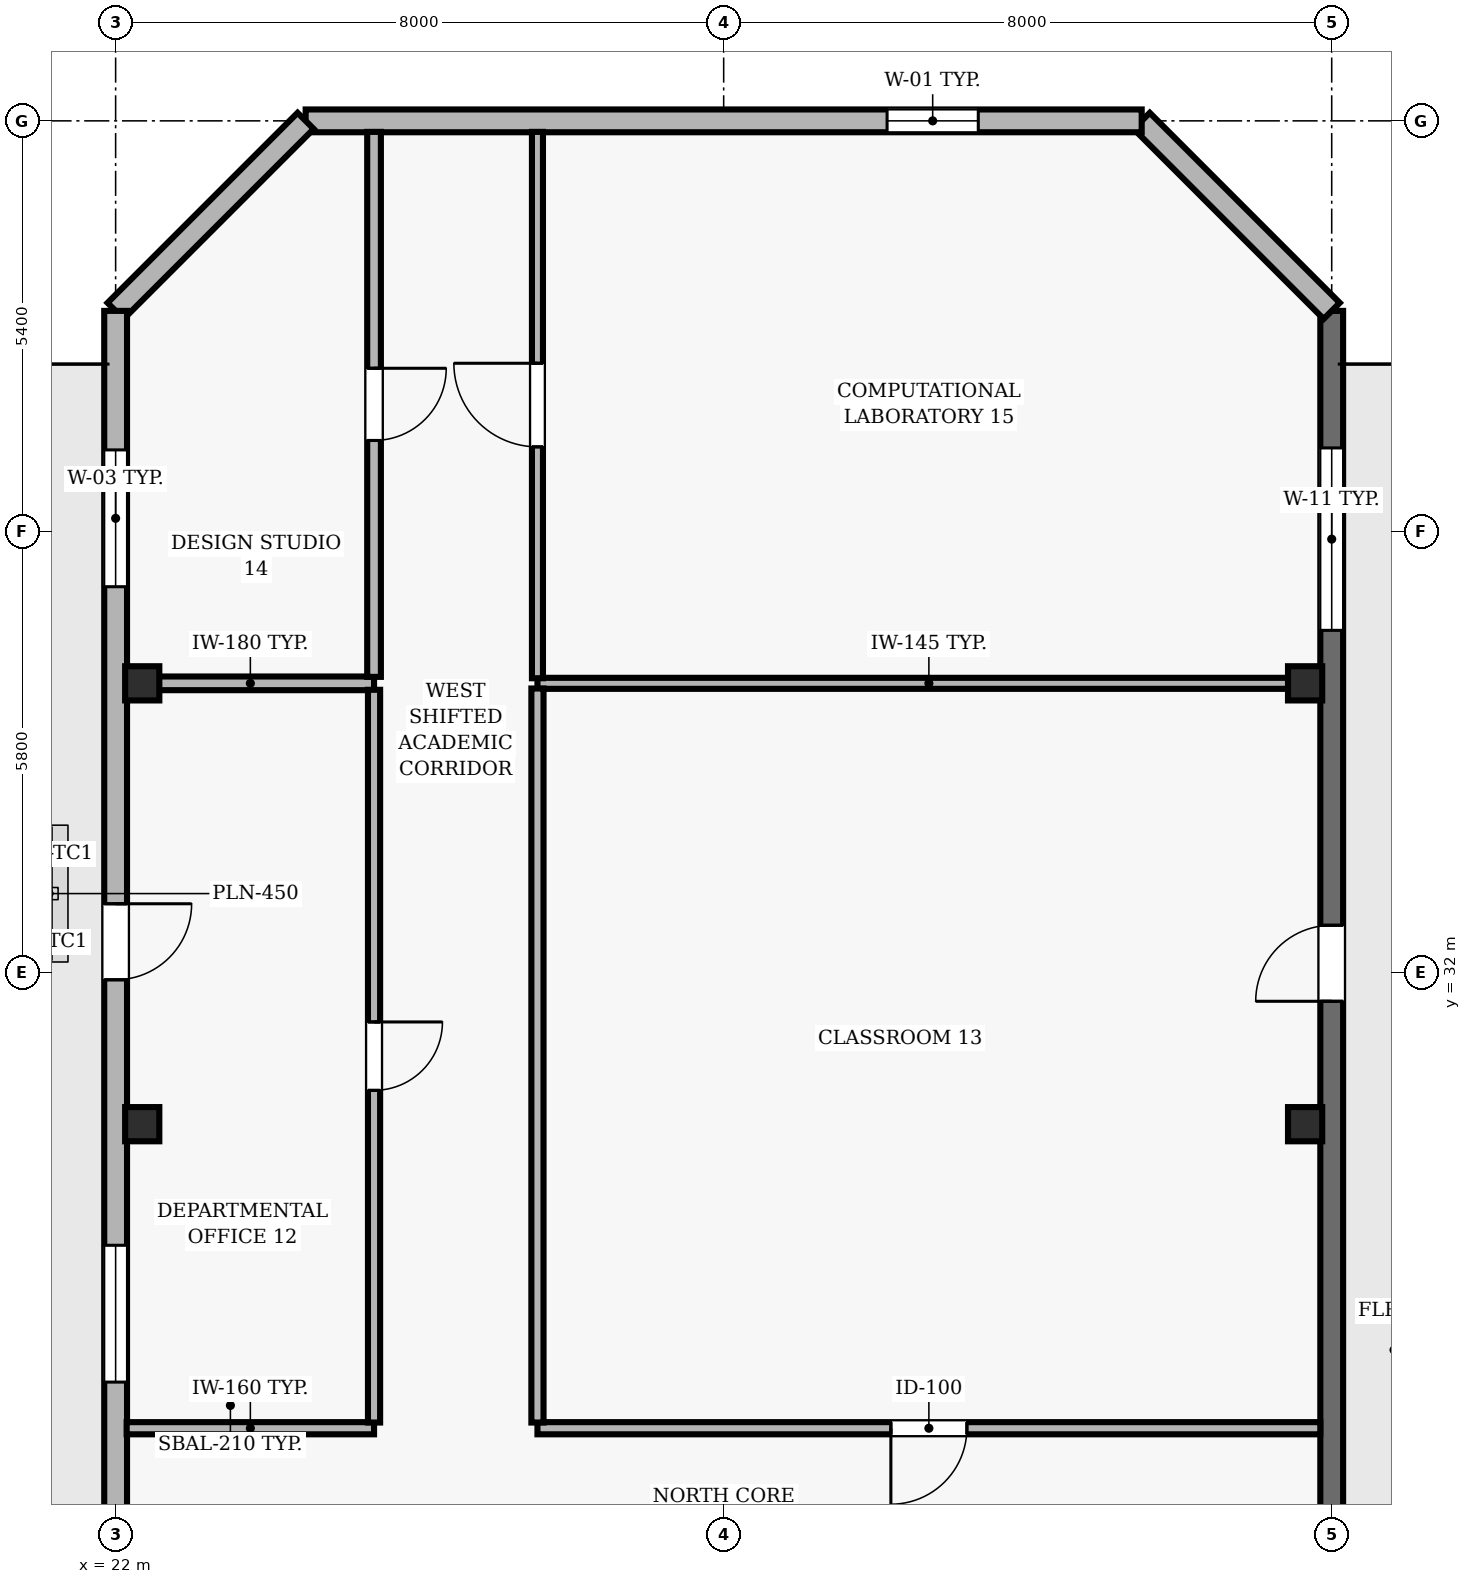
"""IFC4 building model, lengths in metres.
Left out: names, types, materials, properties, quantities, classifications, styles, units other than length and angle.
Written with IfcOpenShell. Run it as: python <this file> out.ifc"""

import sys

from ifc_helpers import new_model, si_unit, direction, frame, frame_2d, origin, origin_2d, place, context, subcontext, project, spatial, rectangle, hollow_rectangle, extrude, element, fill, save


model = new_model("IFC4")
c1 = context("Model", 3, precision=1e-05, world=origin(), true_north=direction((0.0, 1.0)))
c2 = subcontext(c1, "Body", "Model", "MODEL_VIEW")
j1 = project(units=[si_unit("LENGTHUNIT", "METRE"), si_unit("PLANEANGLEUNIT", "RADIAN")], contexts=[c1])
p1 = place(None, origin())
s1 = spatial("IfcSite", under=j1, at=p1, CompositionType="ELEMENT")
p2 = place(p1, origin())
s2 = spatial("IfcBuilding", under=s1, at=p2, CompositionType="ELEMENT")
p3 = place(p2, frame((0.0, 0.0, 207.0)))
s3 = spatial("IfcBuildingStorey", under=s2, at=p3, CompositionType="ELEMENT", Elevation=207.0)
for number, where, z_axis, x_axis in (
    (1, (22.35, 30.0, 0.0), (0.0, 0.0, 1.0), (1.0, 0.0, 0.0)),
    (2, (37.65, 30.0, 0.0), (0.0, 0.0, 1.0), (1.0, 0.0, 0.0)),
    (3, (22.35, 35.8, 0.0), (0.0, 0.0, 1.0), (1.0, 0.0, 0.0)),
    (4, (37.65, 35.8, 0.0), (0.0, 0.0, 1.0), (1.0, 0.0, 0.0)),
):
    element("IfcColumn", number, at=place(p3, frame(where, z_axis=z_axis, x_axis=x_axis)), inside=s3, PredefinedType="COLUMN", context=c2, shape_type="SweptSolid", body=[
        extrude(hollow_rectangle(XDim=0.45, YDim=0.45, WallThickness=0.02, at=origin_2d()), origin(), (0.0, 0.0, 1.0), 3.9),
    ])
p4 = place(p3, frame((38.0, 22.683, 0.0), z_axis=(0.0, 0.0, 1.0), x_axis=(0.0, 1.0, 0.0)))
e5 = element("IfcWall", 5, at=p4, inside=s3, PredefinedType="SOLIDWALL", context=c2, shape_type="SweptSolid", body=[
    extrude(rectangle(XDim=18.017, YDim=0.3, at=frame_2d((9.008, 0.0))), origin(), (0.0, 0.0, 1.0), 3.69),
])
p5 = place(p4, frame((8.934, 0.0, 0.0)))
e6 = element("IfcOpeningElement", 6, at=p5, cuts=e5, PredefinedType="OPENING", context=c2, shape_type="SweptSolid", body=[
    extrude(rectangle(XDim=1.0, YDim=2.2, at=frame_2d((0.5, 1.1))), frame((0.0, 0.16, 0.0), z_axis=(0.0, -1.0, 0.0), x_axis=(1.0, 0.0, 0.0)), (0.0, 0.0, 1.0), 0.32),
])
p6 = place(p4, frame((13.814, 0.0, 0.9)))
e7 = element("IfcOpeningElement", 7, at=p6, cuts=e5, PredefinedType="OPENING", context=c2, shape_type="SweptSolid", body=[
    extrude(rectangle(XDim=2.4, YDim=2.2, at=frame_2d((1.2, 1.1))), frame((0.0, 0.16, 0.0), z_axis=(0.0, -1.0, 0.0), x_axis=(1.0, 0.0, 0.0)), (0.0, 0.0, 1.0), 0.32),
])
p7 = place(p3, frame((38.0, 40.7, 0.0), z_axis=(0.0, 0.0, 1.0), x_axis=(-0.707106781187, 0.707106781187, 0.0)))
e8 = element("IfcWall", 8, at=p7, inside=s3, PredefinedType="SOLIDWALL", context=c2, shape_type="SweptSolid", body=[
    extrude(rectangle(XDim=3.536, YDim=0.3, at=frame_2d((1.768, 0.0))), origin(), (0.0, 0.0, 1.0), 3.69),
])
p8 = place(p3, frame((35.5, 43.2, 0.0), z_axis=(0.0, 0.0, 1.0), x_axis=(-1.0, 0.0, 0.0)))
e9 = element("IfcWall", 9, at=p8, inside=s3, PredefinedType="SOLIDWALL", context=c2, shape_type="SweptSolid", body=[
    extrude(rectangle(XDim=11.0, YDim=0.3, at=frame_2d((5.5, 0.0))), origin(), (0.0, 0.0, 1.0), 3.69),
])
p9 = place(p8, frame((2.15, 0.0, 0.9)))
e10 = element("IfcOpeningElement", 10, at=p9, cuts=e9, PredefinedType="OPENING", context=c2, shape_type="SweptSolid", body=[
    extrude(rectangle(XDim=1.2, YDim=1.6, at=frame_2d((0.6, 0.8))), frame((0.0, 0.16, 0.0), z_axis=(0.0, -1.0, 0.0), x_axis=(1.0, 0.0, 0.0)), (0.0, 0.0, 1.0), 0.32),
])
p10 = place(p3, frame((24.5, 43.2, 0.0), z_axis=(0.0, 0.0, 1.0), x_axis=(-0.707106781187, -0.707106781187, 0.0)))
e11 = element("IfcWall", 11, at=p10, inside=s3, PredefinedType="SOLIDWALL", context=c2, shape_type="SweptSolid", body=[
    extrude(rectangle(XDim=3.536, YDim=0.3, at=frame_2d((1.768, 0.0))), origin(), (0.0, 0.0, 1.0), 3.69),
])
p11 = place(p3, frame((22.0, 40.7, 0.0), z_axis=(0.0, 0.0, 1.0), x_axis=(0.0, -1.0, 0.0)))
e12 = element("IfcWall", 12, at=p11, inside=s3, PredefinedType="SOLIDWALL", context=c2, shape_type="SweptSolid", body=[
    extrude(rectangle(XDim=38.2, YDim=0.3, at=frame_2d((19.1, 0.0))), origin(), (0.0, 0.0, 1.0), 3.69),
])
p12 = place(p11, frame((7.8, 0.0, 0.0)))
e13 = element("IfcOpeningElement", 13, at=p12, cuts=e12, PredefinedType="OPENING", context=c2, shape_type="SweptSolid", body=[
    extrude(rectangle(XDim=1.0, YDim=2.2, at=frame_2d((0.5, 1.1))), frame((0.0, 0.16, 0.0), z_axis=(0.0, -1.0, 0.0), x_axis=(1.0, 0.0, 0.0)), (0.0, 0.0, 1.0), 0.32),
])
p13 = place(p11, frame((1.829, 0.0, 0.9)))
e14 = element("IfcOpeningElement", 14, at=p13, cuts=e12, PredefinedType="OPENING", context=c2, shape_type="SweptSolid", body=[
    extrude(rectangle(XDim=1.8, YDim=1.6, at=frame_2d((0.9, 0.8))), frame((0.0, 0.16, 0.0), z_axis=(0.0, -1.0, 0.0), x_axis=(1.0, 0.0, 0.0)), (0.0, 0.0, 1.0), 0.32),
])
p14 = place(p11, frame((12.293, 0.0, 0.9)))
e15 = element("IfcOpeningElement", 15, at=p14, cuts=e12, PredefinedType="OPENING", context=c2, shape_type="SweptSolid", body=[
    extrude(rectangle(XDim=1.8, YDim=1.6, at=frame_2d((0.9, 0.8))), frame((0.0, 0.16, 0.0), z_axis=(0.0, -1.0, 0.0), x_axis=(1.0, 0.0, 0.0)), (0.0, 0.0, 1.0), 0.32),
])
p15 = place(p11, frame((18.2, 0.0, 0.9)))
e16 = element("IfcOpeningElement", 16, at=p15, cuts=e12, PredefinedType="OPENING", context=c2, shape_type="SweptSolid", body=[
    extrude(rectangle(XDim=1.8, YDim=1.6, at=frame_2d((0.9, 0.8))), frame((0.0, 0.16, 0.0), z_axis=(0.0, -1.0, 0.0), x_axis=(1.0, 0.0, 0.0)), (0.0, 0.0, 1.0), 0.32),
])
p16 = place(p11, frame((23.207, 0.0, 0.9)))
e17 = element("IfcOpeningElement", 17, at=p16, cuts=e12, PredefinedType="OPENING", context=c2, shape_type="SweptSolid", body=[
    extrude(rectangle(XDim=1.8, YDim=1.6, at=frame_2d((0.9, 0.8))), frame((0.0, 0.16, 0.0), z_axis=(0.0, -1.0, 0.0), x_axis=(1.0, 0.0, 0.0)), (0.0, 0.0, 1.0), 0.32),
])
p17 = place(p11, frame((29.114, 0.0, 0.9)))
e18 = element("IfcOpeningElement", 18, at=p17, cuts=e12, PredefinedType="OPENING", context=c2, shape_type="SweptSolid", body=[
    extrude(rectangle(XDim=1.8, YDim=1.6, at=frame_2d((0.9, 0.8))), frame((0.0, 0.16, 0.0), z_axis=(0.0, -1.0, 0.0), x_axis=(1.0, 0.0, 0.0)), (0.0, 0.0, 1.0), 0.32),
])
p18 = place(p3, frame((25.4, 26.0, 0.0), z_axis=(0.0, 0.0, 1.0), x_axis=(-1.0, 0.0, 0.0)))
e19 = element("IfcWall", 19, at=p18, inside=s3, PredefinedType="PARTITIONING", context=c2, shape_type="SweptSolid", body=[
    extrude(rectangle(XDim=3.255, YDim=0.16, at=frame_2d((1.627, 0.0))), origin(), (0.0, 0.0, 1.0), 3.69),
])
p19 = place(p3, frame((25.4, 35.8, 0.0), z_axis=(0.0, 0.0, 1.0), x_axis=(-1.0, 0.0, 0.0)))
e20 = element("IfcWall", 20, at=p19, inside=s3, PredefinedType="PARTITIONING", context=c2, shape_type="SweptSolid", body=[
    extrude(rectangle(XDim=3.255, YDim=0.18, at=frame_2d((1.627, 0.0))), origin(), (0.0, 0.0, 1.0), 3.139),
])
p20 = place(p3, frame((37.85, 26.0, 0.0), z_axis=(0.0, 0.0, 1.0), x_axis=(-1.0, 0.0, 0.0)))
e21 = element("IfcWall", 21, at=p20, inside=s3, PredefinedType="PARTITIONING", context=c2, shape_type="SweptSolid", body=[
    extrude(rectangle(XDim=10.3, YDim=0.16, at=frame_2d((5.15, 0.0))), origin(), (0.0, 0.0, 1.0), 3.69),
])
p21 = place(p20, frame((4.65, 0.0, 0.0)))
e22 = element("IfcOpeningElement", 22, at=p21, cuts=e21, PredefinedType="OPENING", context=c2, shape_type="SweptSolid", body=[
    extrude(rectangle(XDim=1.0, YDim=2.1, at=frame_2d((0.5, 1.05))), frame((0.0, 0.09, 0.0), z_axis=(0.0, -1.0, 0.0), x_axis=(1.0, 0.0, 0.0)), (0.0, 0.0, 1.0), 0.18),
])
p22 = place(p3, frame((37.85, 35.8, 0.0), z_axis=(0.0, 0.0, 1.0), x_axis=(-1.0, 0.0, 0.0)))
e23 = element("IfcWall", 23, at=p22, inside=s3, PredefinedType="PARTITIONING", context=c2, shape_type="SweptSolid", body=[
    extrude(rectangle(XDim=10.3, YDim=0.145, at=frame_2d((5.15, 0.0))), origin(), (0.0, 0.0, 1.0), 3.139),
])
p23 = place(p3, frame((25.4, 35.715, 0.0), z_axis=(0.0, 0.0, 1.0), x_axis=(0.0, -1.0, 0.0)))
e24 = element("IfcWall", 24, at=p23, inside=s3, PredefinedType="PARTITIONING", context=c2, shape_type="SweptSolid", body=[
    extrude(rectangle(XDim=9.64, YDim=0.16, at=frame_2d((4.82, 0.0))), origin(), (0.0, 0.0, 1.0), 3.69),
])
p24 = place(p23, frame((4.37, 0.0, 0.0)))
e25 = element("IfcOpeningElement", 25, at=p24, cuts=e24, PredefinedType="OPENING", context=c2, shape_type="SweptSolid", body=[
    extrude(rectangle(XDim=0.9, YDim=2.1, at=frame_2d((0.45, 1.05))), frame((0.0, 0.09, 0.0), z_axis=(0.0, -1.0, 0.0), x_axis=(1.0, 0.0, 0.0)), (0.0, 0.0, 1.0), 0.18),
])
p25 = place(p3, frame((25.4, 43.055, 0.0), z_axis=(0.0, 0.0, 1.0), x_axis=(0.0, -1.0, 0.0)))
e26 = element("IfcWall", 26, at=p25, inside=s3, PredefinedType="PARTITIONING", context=c2, shape_type="SweptSolid", body=[
    extrude(rectangle(XDim=7.17, YDim=0.18, at=frame_2d((3.585, 0.0))), origin(), (0.0, 0.0, 1.0), 3.69),
])
p26 = place(p25, frame((3.11, 0.0, 0.0)))
e27 = element("IfcOpeningElement", 27, at=p26, cuts=e26, PredefinedType="OPENING", context=c2, shape_type="SweptSolid", body=[
    extrude(rectangle(XDim=0.95, YDim=2.1, at=frame_2d((0.475, 1.05))), frame((0.0, 0.1, 0.0), z_axis=(0.0, -1.0, 0.0), x_axis=(1.0, 0.0, 0.0)), (0.0, 0.0, 1.0), 0.2),
])
p27 = place(p3, frame((27.55, 26.075, 0.0), z_axis=(0.0, 0.0, 1.0), x_axis=(0.0, 1.0, 0.0)))
e28 = element("IfcWall", 28, at=p27, inside=s3, PredefinedType="PARTITIONING", context=c2, shape_type="SweptSolid", body=[
    extrude(rectangle(XDim=9.657, YDim=0.16, at=frame_2d((4.829, 0.0))), origin(), (0.0, 0.0, 1.0), 3.69),
])
p28 = place(p3, frame((27.55, 35.867, 0.0), z_axis=(0.0, 0.0, 1.0), x_axis=(0.0, 1.0, 0.0)))
e29 = element("IfcWall", 29, at=p28, inside=s3, PredefinedType="PARTITIONING", context=c2, shape_type="SweptSolid", body=[
    extrude(rectangle(XDim=7.188, YDim=0.145, at=frame_2d((3.594, 0.0))), origin(), (0.0, 0.0, 1.0), 3.69),
])
p29 = place(p28, frame((3.044, 0.0, 0.0)))
e30 = element("IfcOpeningElement", 30, at=p29, cuts=e29, PredefinedType="OPENING", context=c2, shape_type="SweptSolid", body=[
    extrude(rectangle(XDim=1.1, YDim=2.15, at=frame_2d((0.55, 1.075))), frame((0.0, 0.083, 0.0), z_axis=(0.0, -1.0, 0.0), x_axis=(1.0, 0.0, 0.0)), (0.0, 0.0, 1.0), 0.165),
])
p30 = place(p5, origin())
e31 = element("IfcDoor", 31, at=p30, inside=s3, OperationType="SINGLE_SWING_LEFT", PredefinedType="DOOR", context=c2, shape_type="SweptSolid", body=[
    extrude(rectangle(XDim=1.0, YDim=2.2, at=frame_2d((0.5, 1.1))), frame((0.0, 0.025, 0.0), z_axis=(0.0, -1.0, 0.0), x_axis=(1.0, 0.0, 0.0)), (0.0, 0.0, 1.0), 0.05),
])
fill(e6, e31)
p31 = place(p6, origin())
e32 = element("IfcWindow", 32, at=p31, inside=s3, PartitioningType="SINGLE_PANEL", PredefinedType="WINDOW", context=c2, shape_type="SweptSolid", body=[
    extrude(rectangle(XDim=2.4, YDim=2.2, at=frame_2d((1.2, 1.1))), frame((0.0, 0.03, 0.0), z_axis=(0.0, -1.0, 0.0), x_axis=(1.0, 0.0, 0.0)), (0.0, 0.0, 1.0), 0.06),
])
fill(e7, e32)
p32 = place(p9, origin())
e33 = element("IfcWindow", 33, at=p32, inside=s3, PartitioningType="SINGLE_PANEL", PredefinedType="WINDOW", context=c2, shape_type="SweptSolid", body=[
    extrude(rectangle(XDim=1.2, YDim=1.6, at=frame_2d((0.6, 0.8))), frame((0.0, 0.03, 0.0), z_axis=(0.0, -1.0, 0.0), x_axis=(1.0, 0.0, 0.0)), (0.0, 0.0, 1.0), 0.06),
])
fill(e10, e33)
p33 = place(p12, origin())
e34 = element("IfcDoor", 34, at=p33, inside=s3, OperationType="SINGLE_SWING_LEFT", PredefinedType="DOOR", context=c2, shape_type="SweptSolid", body=[
    extrude(rectangle(XDim=1.0, YDim=2.2, at=frame_2d((0.5, 1.1))), frame((0.0, 0.025, 0.0), z_axis=(0.0, -1.0, 0.0), x_axis=(1.0, 0.0, 0.0)), (0.0, 0.0, 1.0), 0.05),
])
fill(e13, e34)
p34 = place(p13, origin())
e35 = element("IfcWindow", 35, at=p34, inside=s3, PartitioningType="SINGLE_PANEL", PredefinedType="WINDOW", context=c2, shape_type="SweptSolid", body=[
    extrude(rectangle(XDim=1.8, YDim=1.6, at=frame_2d((0.9, 0.8))), frame((0.0, 0.03, 0.0), z_axis=(0.0, -1.0, 0.0), x_axis=(1.0, 0.0, 0.0)), (0.0, 0.0, 1.0), 0.06),
])
fill(e14, e35)
p35 = place(p14, origin())
e36 = element("IfcWindow", 36, at=p35, inside=s3, PartitioningType="SINGLE_PANEL", PredefinedType="WINDOW", context=c2, shape_type="SweptSolid", body=[
    extrude(rectangle(XDim=1.8, YDim=1.6, at=frame_2d((0.9, 0.8))), frame((0.0, 0.03, 0.0), z_axis=(0.0, -1.0, 0.0), x_axis=(1.0, 0.0, 0.0)), (0.0, 0.0, 1.0), 0.06),
])
fill(e15, e36)
p36 = place(p24, origin())
e37 = element("IfcDoor", 37, at=p36, inside=s3, OperationType="SINGLE_SWING_LEFT", PredefinedType="DOOR", context=c2, shape_type="SweptSolid", body=[
    extrude(rectangle(XDim=0.9, YDim=2.1, at=frame_2d((0.45, 1.05))), frame((0.0, 0.025, 0.0), z_axis=(0.0, -1.0, 0.0), x_axis=(1.0, 0.0, 0.0)), (0.0, 0.0, 1.0), 0.05),
])
fill(e25, e37)
p37 = place(p21, origin())
e38 = element("IfcDoor", 38, at=p37, inside=s3, OperationType="SINGLE_SWING_RIGHT", PredefinedType="DOOR", context=c2, shape_type="SweptSolid", body=[
    extrude(rectangle(XDim=1.0, YDim=2.1, at=frame_2d((0.5, 1.05))), frame((0.0, 0.025, 0.0), z_axis=(0.0, -1.0, 0.0), x_axis=(1.0, 0.0, 0.0)), (0.0, 0.0, 1.0), 0.05),
])
fill(e22, e38)
p38 = place(p26, origin())
e39 = element("IfcDoor", 39, at=p38, inside=s3, OperationType="SINGLE_SWING_LEFT", PredefinedType="DOOR", context=c2, shape_type="SweptSolid", body=[
    extrude(rectangle(XDim=0.95, YDim=2.1, at=frame_2d((0.475, 1.05))), frame((0.0, 0.025, 0.0), z_axis=(0.0, -1.0, 0.0), x_axis=(1.0, 0.0, 0.0)), (0.0, 0.0, 1.0), 0.05),
])
fill(e27, e39)
p39 = place(p29, origin())
e40 = element("IfcDoor", 40, at=p39, inside=s3, OperationType="SINGLE_SWING_RIGHT", PredefinedType="DOOR", context=c2, shape_type="SweptSolid", body=[
    extrude(rectangle(XDim=1.1, YDim=2.15, at=frame_2d((0.55, 1.075))), frame((0.0, 0.025, 0.0), z_axis=(0.0, -1.0, 0.0), x_axis=(1.0, 0.0, 0.0)), (0.0, 0.0, 1.0), 0.05),
])
fill(e30, e40)
save(model, sys.argv[1])
